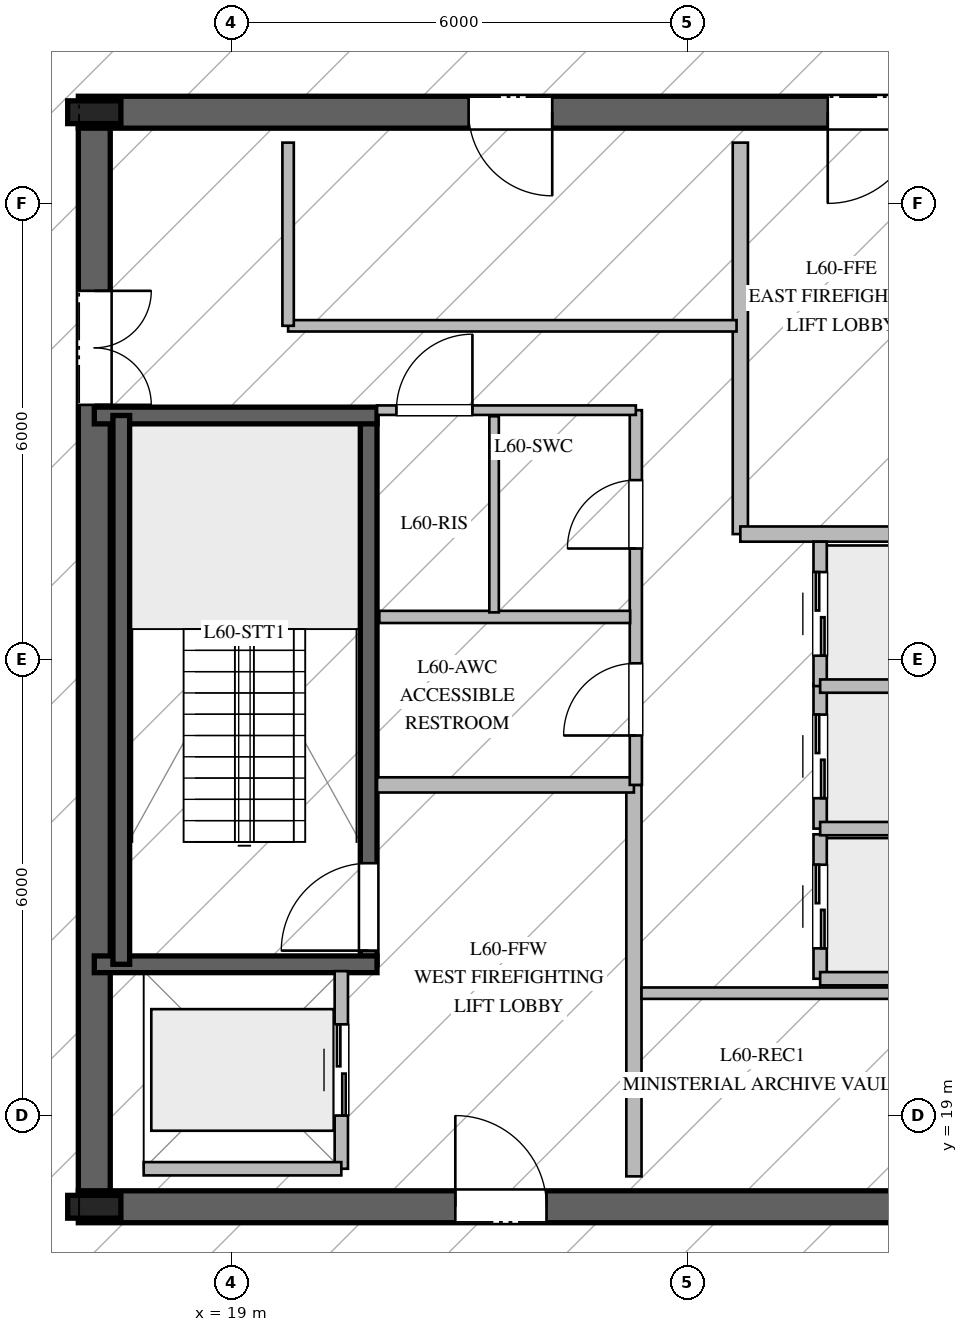
"""IFC4 building model, lengths in metres.
Left out: names, types, materials, properties, quantities, classifications, styles, units other than length and angle.
Written with IfcOpenShell. Run it as: python <this file> out.ifc"""

import sys

from ifc_helpers import new_model, si_unit, direction, frame, frame_2d, origin, origin_2d, place, context, subcontext, project, spatial, rectangle, i_section, extrude, element, fill, save


model = new_model("IFC4")
c1 = context("Model", 3, precision=1e-05, world=origin(), true_north=direction((0.0, 1.0)))
c2 = subcontext(c1, "Body", "Model", "MODEL_VIEW")
j1 = project(units=[si_unit("LENGTHUNIT", "METRE"), si_unit("PLANEANGLEUNIT", "RADIAN")], contexts=[c1])
p1 = place(None, origin())
s1 = spatial("IfcSite", under=j1, at=p1, CompositionType="ELEMENT")
p2 = place(p1, origin())
s2 = spatial("IfcBuilding", under=s1, at=p2, CompositionType="ELEMENT")
p3 = place(p2, frame((0.0, 0.0, 250.2)))
s3 = spatial("IfcBuildingStorey", under=s2, at=p3, CompositionType="ELEMENT", Elevation=250.2)
p4 = place(p3, frame((16.99, 17.8, 0.0), z_axis=(0.0, 0.0, 1.0), x_axis=(1.0, 0.0, 0.0)))
e1 = element("IfcWall", 1, at=p4, inside=s3, PredefinedType="SHEAR", context=c2, shape_type="SweptSolid", body=[
    extrude(rectangle(XDim=16.02, YDim=0.42, at=frame_2d((8.01, 0.0))), origin(), (0.0, 0.0, 1.0), 3.78),
])
p5 = place(p4, frame((4.96, 0.0, 0.0)))
e2 = element("IfcOpeningElement", 2, at=p5, cuts=e1, PredefinedType="OPENING", context=c2, shape_type="SweptSolid", body=[
    extrude(rectangle(XDim=1.2, YDim=2.25, at=frame_2d((0.6, 1.125))), frame((0.0, 0.22, 0.0), z_axis=(0.0, -1.0, 0.0), x_axis=(1.0, 0.0, 0.0)), (0.0, 0.0, 1.0), 0.44),
])
p6 = place(p4, frame((10.86, 0.0, 0.0)))
e3 = element("IfcOpeningElement", 3, at=p6, cuts=e1, PredefinedType="OPENING", context=c2, shape_type="SweptSolid", body=[
    extrude(rectangle(XDim=1.1, YDim=2.2, at=frame_2d((0.55, 1.1))), frame((0.0, 0.22, 0.0), z_axis=(0.0, -1.0, 0.0), x_axis=(1.0, 0.0, 0.0)), (0.0, 0.0, 1.0), 0.44),
])
p7 = place(p3, frame((33.01, 32.2, 0.0), z_axis=(0.0, 0.0, 1.0), x_axis=(-1.0, 0.0, 0.0)))
e4 = element("IfcWall", 4, at=p7, inside=s3, PredefinedType="SHEAR", context=c2, shape_type="SweptSolid", body=[
    extrude(rectangle(XDim=16.02, YDim=0.42, at=frame_2d((8.01, 0.0))), origin(), (0.0, 0.0, 1.0), 3.78),
])
p8 = place(p7, frame((4.96, 0.0, 0.0)))
e5 = element("IfcOpeningElement", 5, at=p8, cuts=e4, PredefinedType="OPENING", context=c2, shape_type="SweptSolid", body=[
    extrude(rectangle(XDim=1.2, YDim=2.25, at=frame_2d((0.6, 1.125))), frame((0.0, 0.22, 0.0), z_axis=(0.0, -1.0, 0.0), x_axis=(1.0, 0.0, 0.0)), (0.0, 0.0, 1.0), 0.44),
])
p9 = place(p7, frame((9.785, 0.0, 0.0)))
e6 = element("IfcOpeningElement", 6, at=p9, cuts=e4, PredefinedType="OPENING", context=c2, shape_type="SweptSolid", body=[
    extrude(rectangle(XDim=1.1, YDim=2.2, at=frame_2d((0.55, 1.1))), frame((0.0, 0.22, 0.0), z_axis=(0.0, -1.0, 0.0), x_axis=(1.0, 0.0, 0.0)), (0.0, 0.0, 1.0), 0.44),
])
p10 = place(p3, frame((17.2, 31.99, 0.0), z_axis=(0.0, 0.0, 1.0), x_axis=(0.0, -1.0, 0.0)))
e7 = element("IfcWall", 7, at=p10, inside=s3, PredefinedType="SHEAR", context=c2, shape_type="SweptSolid", body=[
    extrude(rectangle(XDim=13.98, YDim=0.42, at=frame_2d((6.99, 0.0))), origin(), (0.0, 0.0, 1.0), 3.78),
])
p11 = place(p10, frame((2.14, 0.0, 0.0)))
e8 = element("IfcOpeningElement", 8, at=p11, cuts=e7, PredefinedType="OPENING", context=c2, shape_type="SweptSolid", body=[
    extrude(rectangle(XDim=1.5, YDim=2.2, at=frame_2d((0.75, 1.1))), frame((0.0, 0.22, 0.0), z_axis=(0.0, -1.0, 0.0), x_axis=(1.0, 0.0, 0.0)), (0.0, 0.0, 1.0), 0.44),
])
for number, where, z_axis, x_axis in (
    (9, (17.2, 17.8, 0.0), (0.0, 0.0, 1.0), (1.0, 0.0, 0.0)),
    (10, (17.2, 32.2, 0.0), (0.0, 0.0, 1.0), (1.0, 0.0, 0.0)),
):
    element("IfcColumn", number, at=place(p3, frame(where, z_axis=z_axis, x_axis=x_axis)), inside=s3, PredefinedType="COLUMN", context=c2, shape_type="SweptSolid", body=[
        extrude(i_section(OverallWidth=0.3, OverallDepth=0.7, WebThickness=0.017, FlangeThickness=0.032, at=origin_2d()), origin(), (0.0, 0.0, 1.0), 4.0),
    ])
p12 = place(p3, frame((20.81, 20.99, 0.0), z_axis=(0.0, 0.0, 1.0), x_axis=(0.0, 1.0, 0.0)))
e11 = element("IfcWall", 11, at=p12, inside=s3, PredefinedType="SOLIDWALL", context=c2, shape_type="SweptSolid", body=[
    extrude(rectangle(XDim=7.22, YDim=0.22, at=frame_2d((3.61, 0.0))), origin(), (0.0, 0.0, 1.0), 3.78),
])
p13 = place(p12, frame((0.18, 0.0, 0.0)))
e12 = element("IfcOpeningElement", 12, at=p13, cuts=e11, PredefinedType="OPENING", context=c2, shape_type="SweptSolid", body=[
    extrude(rectangle(XDim=1.15, YDim=2.2, at=frame_2d((0.575, 1.1))), frame((0.0, 0.12, 0.0), z_axis=(0.0, -1.0, 0.0), x_axis=(1.0, 0.0, 0.0)), (0.0, 0.0, 1.0), 0.24),
])
for number, where, z_axis, x_axis in (
    (13, (17.2, 20.99, 0.0), (0.0, 0.0, 1.0), (1.0, 0.0, 0.0)),
    (14, (17.2, 28.21, 0.0), (0.0, 0.0, 1.0), (1.0, 0.0, 0.0)),
):
    element("IfcWall", number, at=place(p3, frame(where, z_axis=z_axis, x_axis=x_axis)), inside=s3, PredefinedType="SOLIDWALL", context=c2, shape_type="SweptSolid", body=[
        extrude(rectangle(XDim=3.72, YDim=0.22, at=frame_2d((1.86, 0.0))), origin(), (0.0, 0.0, 1.0), 3.78),
    ])
p14 = place(p3, frame((17.555, 28.21, 0.0), z_axis=(0.0, 0.0, 1.0), x_axis=(0.0, -1.0, 0.0)))
e15 = element("IfcWall", 15, at=p14, inside=s3, PredefinedType="SOLIDWALL", context=c2, shape_type="SweptSolid", body=[
    extrude(rectangle(XDim=7.22, YDim=0.22, at=frame_2d((3.61, 0.0))), origin(), (0.0, 0.0, 1.0), 3.78),
])
p15 = place(p3, frame((24.3, 18.2, 0.0), z_axis=(0.0, 0.0, 1.0), x_axis=(0.0, 1.0, 0.0)))
e16 = element("IfcWall", 16, at=p15, inside=s3, PredefinedType="PARTITIONING", context=c2, shape_type="SweptSolid", body=[
    extrude(rectangle(XDim=5.15, YDim=0.2, at=frame_2d((2.575, 0.0))), origin(), (0.0, 0.0, 1.0), 3.78),
])
p16 = place(p3, frame((20.92, 23.35, 0.0), z_axis=(0.0, 0.0, 1.0), x_axis=(1.0, 0.0, 0.0)))
e17 = element("IfcWall", 17, at=p16, inside=s3, PredefinedType="PARTITIONING", context=c2, shape_type="SweptSolid", body=[
    extrude(rectangle(XDim=3.38, YDim=0.2, at=frame_2d((1.69, 0.0))), origin(), (0.0, 0.0, 1.0), 3.78),
])
p17 = place(p3, frame((25.7, 26.65, 0.0), z_axis=(0.0, 0.0, 1.0), x_axis=(0.0, 1.0, 0.0)))
e18 = element("IfcWall", 18, at=p17, inside=s3, PredefinedType="PARTITIONING", context=c2, shape_type="SweptSolid", body=[
    extrude(rectangle(XDim=5.15, YDim=0.2, at=frame_2d((2.575, 0.0))), origin(), (0.0, 0.0, 1.0), 3.78),
])
p18 = place(p3, frame((25.7, 26.65, 0.0), z_axis=(0.0, 0.0, 1.0), x_axis=(1.0, 0.0, 0.0)))
e19 = element("IfcWall", 19, at=p18, inside=s3, PredefinedType="PARTITIONING", context=c2, shape_type="SweptSolid", body=[
    extrude(rectangle(XDim=3.38, YDim=0.2, at=frame_2d((1.69, 0.0))), origin(), (0.0, 0.0, 1.0), 3.78),
])
p19 = place(p3, frame((24.325, 23.35, 0.0), z_axis=(0.0, 0.0, 1.0), x_axis=(0.0, 1.0, 0.0)))
e20 = element("IfcWall", 20, at=p19, inside=s3, PredefinedType="PLUMBINGWALL", context=c2, shape_type="SweptSolid", body=[
    extrude(rectangle(XDim=4.93, YDim=0.16, at=frame_2d((2.465, 0.0))), origin(), (0.0, 0.0, 1.0), 3.78),
])
p20 = place(p19, frame((0.65, 0.0, 0.0)))
e21 = element("IfcOpeningElement", 21, at=p20, cuts=e20, PredefinedType="OPENING", context=c2, shape_type="SweptSolid", body=[
    extrude(rectangle(XDim=0.95, YDim=2.1, at=frame_2d((0.475, 1.05))), frame((0.0, 0.09, 0.0), z_axis=(0.0, -1.0, 0.0), x_axis=(1.0, 0.0, 0.0)), (0.0, 0.0, 1.0), 0.18),
])
p21 = place(p19, frame((3.11, 0.0, 0.0)))
e22 = element("IfcOpeningElement", 22, at=p21, cuts=e20, PredefinedType="OPENING", context=c2, shape_type="SweptSolid", body=[
    extrude(rectangle(XDim=0.9, YDim=2.1, at=frame_2d((0.45, 1.05))), frame((0.0, 0.09, 0.0), z_axis=(0.0, -1.0, 0.0), x_axis=(1.0, 0.0, 0.0)), (0.0, 0.0, 1.0), 0.18),
])
p22 = place(p3, frame((20.92, 28.28, 0.0), z_axis=(0.0, 0.0, 1.0), x_axis=(1.0, 0.0, 0.0)))
e23 = element("IfcWall", 23, at=p22, inside=s3, PredefinedType="PARTITIONING", context=c2, shape_type="SweptSolid", body=[
    extrude(rectangle(XDim=3.405, YDim=0.125, at=frame_2d((1.703, 0.0))), origin(), (0.0, 0.0, 1.0), 3.78),
])
p23 = place(p22, frame((0.255, 0.0, 0.0)))
e24 = element("IfcOpeningElement", 24, at=p23, cuts=e23, PredefinedType="OPENING", context=c2, shape_type="SweptSolid", body=[
    extrude(rectangle(XDim=1.0, YDim=2.15, at=frame_2d((0.5, 1.075))), frame((0.0, 0.073, 0.0), z_axis=(0.0, -1.0, 0.0), x_axis=(1.0, 0.0, 0.0)), (0.0, 0.0, 1.0), 0.145),
])
p24 = place(p3, frame((20.95, 25.56, 0.0), z_axis=(0.0, 0.0, 1.0), x_axis=(1.0, 0.0, 0.0)))
e25 = element("IfcWall", 25, at=p24, inside=s3, PredefinedType="PLUMBINGWALL", context=c2, shape_type="SweptSolid", body=[
    extrude(rectangle(XDim=3.3, YDim=0.16, at=frame_2d((1.65, 0.0))), origin(), (0.0, 0.0, 1.0), 3.78),
])
p25 = place(p3, frame((22.46, 25.62, 0.0), z_axis=(0.0, 0.0, 1.0), x_axis=(0.0, 1.0, 0.0)))
e26 = element("IfcWall", 26, at=p25, inside=s3, PredefinedType="PARTITIONING", context=c2, shape_type="SweptSolid", body=[
    extrude(rectangle(XDim=2.58, YDim=0.125, at=frame_2d((1.29, 0.0))), origin(), (0.0, 0.0, 1.0), 3.78),
])
p26 = place(p3, frame((24.4, 20.61, 0.0), z_axis=(0.0, 0.0, 1.0), x_axis=(1.0, 0.0, 0.0)))
e27 = element("IfcWall", 27, at=p26, inside=s3, PredefinedType="PARTITIONING", context=c2, shape_type="SweptSolid", body=[
    extrude(rectangle(XDim=5.9, YDim=0.15, at=frame_2d((2.95, 0.0))), origin(), (0.0, 0.0, 1.0), 3.78),
])
p27 = place(p3, frame((19.75, 29.39, 0.0), z_axis=(0.0, 0.0, 1.0), x_axis=(1.0, 0.0, 0.0)))
e28 = element("IfcWall", 28, at=p27, inside=s3, PredefinedType="PARTITIONING", context=c2, shape_type="SweptSolid", body=[
    extrude(rectangle(XDim=5.9, YDim=0.15, at=frame_2d((2.95, 0.0))), origin(), (0.0, 0.0, 1.0), 3.78),
])
p28 = place(p3, frame((19.75, 29.39, 0.0), z_axis=(0.0, 0.0, 1.0), x_axis=(0.0, 1.0, 0.0)))
e29 = element("IfcWall", 29, at=p28, inside=s3, PredefinedType="PARTITIONING", context=c2, shape_type="SweptSolid", body=[
    extrude(rectangle(XDim=2.41, YDim=0.15, at=frame_2d((1.205, 0.0))), origin(), (0.0, 0.0, 1.0), 3.78),
])
p29 = place(p3, frame((26.75, 20.8, 0.0), z_axis=(0.0, 0.0, 1.0), x_axis=(0.0, 1.0, 0.0)))
e30 = element("IfcWall", 30, at=p29, inside=s3, PredefinedType="PARTITIONING", context=c2, shape_type="SweptSolid", body=[
    extrude(rectangle(XDim=1.9, YDim=0.175, at=frame_2d((0.95, 0.0))), origin(), (0.0, 0.0, 1.0), 3.78),
])
p30 = place(p29, frame((0.4, 0.0, 0.0)))
e31 = element("IfcOpeningElement", 31, at=p30, cuts=e30, PredefinedType="OPENING", context=c2, shape_type="SweptSolid", body=[
    extrude(rectangle(XDim=1.1, YDim=2.2, at=frame_2d((0.55, 1.1))), frame((0.0, 0.098, 0.0), z_axis=(0.0, -1.0, 0.0), x_axis=(1.0, 0.0, 0.0)), (0.0, 0.0, 1.0), 0.195),
])
p31 = place(p3, frame((26.75, 20.8, 0.0), z_axis=(0.0, 0.0, 1.0), x_axis=(1.0, 0.0, 0.0)))
e32 = element("IfcWall", 32, at=p31, inside=s3, PredefinedType="PARTITIONING", context=c2, shape_type="SweptSolid", body=[
    extrude(rectangle(XDim=2.35, YDim=0.175, at=frame_2d((1.175, 0.0))), origin(), (0.0, 0.0, 1.0), 3.78),
])
p32 = place(p3, frame((26.75, 22.775, 0.0), z_axis=(0.0, 0.0, 1.0), x_axis=(0.0, 1.0, 0.0)))
e33 = element("IfcWall", 33, at=p32, inside=s3, PredefinedType="PARTITIONING", context=c2, shape_type="SweptSolid", body=[
    extrude(rectangle(XDim=1.9, YDim=0.175, at=frame_2d((0.95, 0.0))), origin(), (0.0, 0.0, 1.0), 3.78),
])
p33 = place(p32, frame((0.4, 0.0, 0.0)))
e34 = element("IfcOpeningElement", 34, at=p33, cuts=e33, PredefinedType="OPENING", context=c2, shape_type="SweptSolid", body=[
    extrude(rectangle(XDim=1.1, YDim=2.2, at=frame_2d((0.55, 1.1))), frame((0.0, 0.098, 0.0), z_axis=(0.0, -1.0, 0.0), x_axis=(1.0, 0.0, 0.0)), (0.0, 0.0, 1.0), 0.195),
])
p34 = place(p3, frame((26.75, 22.775, 0.0), z_axis=(0.0, 0.0, 1.0), x_axis=(1.0, 0.0, 0.0)))
e35 = element("IfcWall", 35, at=p34, inside=s3, PredefinedType="PARTITIONING", context=c2, shape_type="SweptSolid", body=[
    extrude(rectangle(XDim=2.35, YDim=0.175, at=frame_2d((1.175, 0.0))), origin(), (0.0, 0.0, 1.0), 3.78),
])
p35 = place(p3, frame((26.75, 24.65, 0.0), z_axis=(0.0, 0.0, 1.0), x_axis=(0.0, 1.0, 0.0)))
e36 = element("IfcWall", 36, at=p35, inside=s3, PredefinedType="PARTITIONING", context=c2, shape_type="SweptSolid", body=[
    extrude(rectangle(XDim=1.9, YDim=0.175, at=frame_2d((0.95, 0.0))), origin(), (0.0, 0.0, 1.0), 3.78),
])
p36 = place(p35, frame((0.4, 0.0, 0.0)))
e37 = element("IfcOpeningElement", 37, at=p36, cuts=e36, PredefinedType="OPENING", context=c2, shape_type="SweptSolid", body=[
    extrude(rectangle(XDim=1.1, YDim=2.2, at=frame_2d((0.55, 1.1))), frame((0.0, 0.098, 0.0), z_axis=(0.0, -1.0, 0.0), x_axis=(1.0, 0.0, 0.0)), (0.0, 0.0, 1.0), 0.195),
])
p37 = place(p3, frame((26.75, 24.65, 0.0), z_axis=(0.0, 0.0, 1.0), x_axis=(1.0, 0.0, 0.0)))
e38 = element("IfcWall", 38, at=p37, inside=s3, PredefinedType="PARTITIONING", context=c2, shape_type="SweptSolid", body=[
    extrude(rectangle(XDim=2.35, YDim=0.175, at=frame_2d((1.175, 0.0))), origin(), (0.0, 0.0, 1.0), 3.78),
])
p38 = place(p3, frame((20.45, 18.3, 0.0), z_axis=(0.0, 0.0, 1.0), x_axis=(0.0, 1.0, 0.0)))
e39 = element("IfcWall", 39, at=p38, inside=s3, PredefinedType="PARTITIONING", context=c2, shape_type="SweptSolid", body=[
    extrude(rectangle(XDim=2.6, YDim=0.175, at=frame_2d((1.3, 0.0))), origin(), (0.0, 0.0, 1.0), 3.78),
])
p39 = place(p38, frame((0.7, 0.0, 0.0)))
e40 = element("IfcOpeningElement", 40, at=p39, cuts=e39, PredefinedType="OPENING", context=c2, shape_type="SweptSolid", body=[
    extrude(rectangle(XDim=1.2, YDim=2.2, at=frame_2d((0.6, 1.1))), frame((0.0, 0.098, 0.0), z_axis=(0.0, -1.0, 0.0), x_axis=(1.0, 0.0, 0.0)), (0.0, 0.0, 1.0), 0.195),
])
p40 = place(p3, frame((17.85, 18.3, 0.0), z_axis=(0.0, 0.0, 1.0), x_axis=(1.0, 0.0, 0.0)))
e41 = element("IfcWall", 41, at=p40, inside=s3, PredefinedType="PARTITIONING", context=c2, shape_type="SweptSolid", body=[
    extrude(rectangle(XDim=2.6, YDim=0.175, at=frame_2d((1.3, 0.0))), origin(), (0.0, 0.0, 1.0), 3.78),
])
p41 = place(p13, origin())
e42 = element("IfcDoor", 42, at=p41, inside=s3, OperationType="SINGLE_SWING_LEFT", PredefinedType="DOOR", context=c2, shape_type="SweptSolid", body=[
    extrude(rectangle(XDim=1.15, YDim=2.2, at=frame_2d((0.575, 1.1))), frame((0.0, 0.025, 0.0), z_axis=(0.0, -1.0, 0.0), x_axis=(1.0, 0.0, 0.0)), (0.0, 0.0, 1.0), 0.05),
])
fill(e12, e42)
p42 = place(p5, origin())
e43 = element("IfcDoor", 43, at=p42, inside=s3, OperationType="SINGLE_SWING_LEFT", PredefinedType="DOOR", context=c2, shape_type="SweptSolid", body=[
    extrude(rectangle(XDim=1.2, YDim=2.25, at=frame_2d((0.6, 1.125))), frame((0.0, 0.025, 0.0), z_axis=(0.0, -1.0, 0.0), x_axis=(1.0, 0.0, 0.0)), (0.0, 0.0, 1.0), 0.05),
])
fill(e2, e43)
p43 = place(p8, origin())
e44 = element("IfcDoor", 44, at=p43, inside=s3, OperationType="SINGLE_SWING_RIGHT", PredefinedType="DOOR", context=c2, shape_type="SweptSolid", body=[
    extrude(rectangle(XDim=1.2, YDim=2.25, at=frame_2d((0.6, 1.125))), frame((0.0, 0.025, 0.0), z_axis=(0.0, -1.0, 0.0), x_axis=(1.0, 0.0, 0.0)), (0.0, 0.0, 1.0), 0.05),
])
fill(e5, e44)
p44 = place(p11, origin())
e45 = element("IfcDoor", 45, at=p44, inside=s3, OperationType="DOUBLE_DOOR_SINGLE_SWING", PredefinedType="DOOR", context=c2, shape_type="SweptSolid", body=[
    extrude(rectangle(XDim=1.5, YDim=2.2, at=frame_2d((0.75, 1.1))), frame((0.0, 0.025, 0.0), z_axis=(0.0, -1.0, 0.0), x_axis=(1.0, 0.0, 0.0)), (0.0, 0.0, 1.0), 0.05),
])
fill(e8, e45)
p45 = place(p20, origin())
e46 = element("IfcDoor", 46, at=p45, inside=s3, OperationType="SINGLE_SWING_LEFT", PredefinedType="DOOR", context=c2, shape_type="SweptSolid", body=[
    extrude(rectangle(XDim=0.95, YDim=2.1, at=frame_2d((0.475, 1.05))), frame((0.0, 0.025, 0.0), z_axis=(0.0, -1.0, 0.0), x_axis=(1.0, 0.0, 0.0)), (0.0, 0.0, 1.0), 0.05),
])
fill(e21, e46)
p46 = place(p23, origin())
e47 = element("IfcDoor", 47, at=p46, inside=s3, OperationType="SINGLE_SWING_RIGHT", PredefinedType="DOOR", context=c2, shape_type="SweptSolid", body=[
    extrude(rectangle(XDim=1.0, YDim=2.15, at=frame_2d((0.5, 1.075))), frame((0.0, 0.025, 0.0), z_axis=(0.0, -1.0, 0.0), x_axis=(1.0, 0.0, 0.0)), (0.0, 0.0, 1.0), 0.05),
])
fill(e24, e47)
p47 = place(p21, origin())
e48 = element("IfcDoor", 48, at=p47, inside=s3, OperationType="SINGLE_SWING_LEFT", PredefinedType="DOOR", context=c2, shape_type="SweptSolid", body=[
    extrude(rectangle(XDim=0.9, YDim=2.1, at=frame_2d((0.45, 1.05))), frame((0.0, 0.025, 0.0), z_axis=(0.0, -1.0, 0.0), x_axis=(1.0, 0.0, 0.0)), (0.0, 0.0, 1.0), 0.05),
])
fill(e22, e48)
p48 = place(p9, origin())
e49 = element("IfcDoor", 49, at=p48, inside=s3, OperationType="SINGLE_SWING_LEFT", PredefinedType="DOOR", context=c2, shape_type="SweptSolid", body=[
    extrude(rectangle(XDim=1.1, YDim=2.2, at=frame_2d((0.55, 1.1))), frame((0.0, 0.025, 0.0), z_axis=(0.0, -1.0, 0.0), x_axis=(1.0, 0.0, 0.0)), (0.0, 0.0, 1.0), 0.05),
])
fill(e6, e49)
p49 = place(p30, origin())
e50 = element("IfcDoor", 50, at=p49, inside=s3, OperationType="DOUBLE_DOOR_SLIDING", PredefinedType="DOOR", context=c2, shape_type="SweptSolid", body=[
    extrude(rectangle(XDim=1.1, YDim=2.2, at=frame_2d((0.55, 1.1))), frame((0.0, 0.025, 0.0), z_axis=(0.0, -1.0, 0.0), x_axis=(1.0, 0.0, 0.0)), (0.0, 0.0, 1.0), 0.05),
])
fill(e31, e50)
p50 = place(p33, origin())
e51 = element("IfcDoor", 51, at=p50, inside=s3, OperationType="DOUBLE_DOOR_SLIDING", PredefinedType="DOOR", context=c2, shape_type="SweptSolid", body=[
    extrude(rectangle(XDim=1.1, YDim=2.2, at=frame_2d((0.55, 1.1))), frame((0.0, 0.025, 0.0), z_axis=(0.0, -1.0, 0.0), x_axis=(1.0, 0.0, 0.0)), (0.0, 0.0, 1.0), 0.05),
])
fill(e34, e51)
p51 = place(p36, origin())
e52 = element("IfcDoor", 52, at=p51, inside=s3, OperationType="DOUBLE_DOOR_SLIDING", PredefinedType="DOOR", context=c2, shape_type="SweptSolid", body=[
    extrude(rectangle(XDim=1.1, YDim=2.2, at=frame_2d((0.55, 1.1))), frame((0.0, 0.025, 0.0), z_axis=(0.0, -1.0, 0.0), x_axis=(1.0, 0.0, 0.0)), (0.0, 0.0, 1.0), 0.05),
])
fill(e37, e52)
p52 = place(p39, origin())
e53 = element("IfcDoor", 53, at=p52, inside=s3, OperationType="DOUBLE_DOOR_SLIDING", PredefinedType="DOOR", context=c2, shape_type="SweptSolid", body=[
    extrude(rectangle(XDim=1.2, YDim=2.2, at=frame_2d((0.6, 1.1))), frame((0.0, 0.025, 0.0), z_axis=(0.0, -1.0, 0.0), x_axis=(1.0, 0.0, 0.0)), (0.0, 0.0, 1.0), 0.05),
])
fill(e40, e53)
save(model, sys.argv[1])
